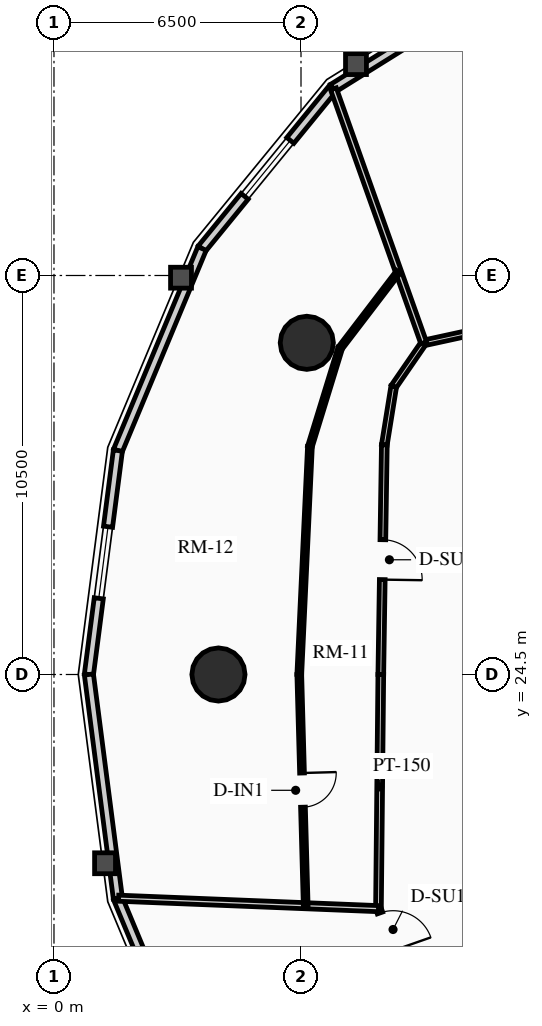
"""IFC4 building model, lengths in metres.
Left out: names, types, materials, properties, quantities, classifications, styles, units other than length and angle.
Written with IfcOpenShell. Run it as: python <this file> out.ifc"""

import sys

from ifc_helpers import new_model, si_unit, direction, frame, frame_2d, origin, origin_2d, place, context, subcontext, project, spatial, rectangle, circle, extrude, source, transform, mapped, element, fill, save


model = new_model("IFC4")
c1 = context("Model", 3, precision=1e-05, world=origin(), true_north=direction((0.0, 1.0)))
c2 = subcontext(c1, "Body", "Model", "MODEL_VIEW")
j1 = project(units=[si_unit("LENGTHUNIT", "METRE"), si_unit("PLANEANGLEUNIT", "RADIAN")], contexts=[c1])
p1 = place(None, origin())
s1 = spatial("IfcSite", under=j1, at=p1, CompositionType="ELEMENT")
p2 = place(p1, origin())
s2 = spatial("IfcBuilding", under=s1, at=p2, CompositionType="ELEMENT")
p3 = place(p2, frame((0.0, 0.0, 116.71)))
s3 = spatial("IfcBuildingStorey", under=s2, at=p3, CompositionType="ELEMENT", Elevation=116.71)
for number, where, z_axis, x_axis in (
    (1, (6.653, 33.229, 0.0), (0.0, 0.0, 1.0), (1.0, 0.0, 0.0)),
    (2, (4.328, 24.5, 0.0), (0.0, 0.0, 1.0), (1.0, 0.0, 0.0)),
):
    element("IfcColumn", number, at=place(p3, frame(where, z_axis=z_axis, x_axis=x_axis)), inside=s3, PredefinedType="USERDEFINED", context=c2, shape_type="SweptSolid", body=[
        extrude(circle(Radius=0.7, at=origin_2d()), origin(), (0.0, 0.0, 1.0), 2.91),
    ])
p4 = place(p3, frame((7.342, 39.928, 0.0), z_axis=(0.0, 0.0, 1.0), x_axis=(0.848520380187, 0.529162701263, 0.0)))
e3 = element("IfcWall", 3, at=p4, inside=s3, PredefinedType="SOLIDWALL", context=c2, shape_type="SweptSolid", body=[
    extrude(rectangle(XDim=5.119, YDim=0.24, at=frame_2d((2.56, 0.0))), origin(), (0.0, 0.0, 1.0), 2.179),
])
p5 = place(p3, frame((3.895, 35.709, 0.0), z_axis=(0.0, 0.0, 1.0), x_axis=(0.632700781152, 0.77439635945, 0.0)))
e4 = element("IfcWall", 4, at=p5, inside=s3, PredefinedType="SOLIDWALL", context=c2, shape_type="SweptSolid", body=[
    extrude(rectangle(XDim=5.448, YDim=0.24, at=frame_2d((2.724, 0.0))), origin(), (0.0, 0.0, 1.0), 2.179),
])
m1 = source(origin(), c2, "Body", "SweptSolid", [
    extrude(rectangle(XDim=1.9, YDim=1.35, at=frame_2d((0.95, 0.675))), frame((0.0, 0.13, 0.0), z_axis=(0.0, -1.0, 0.0), x_axis=(1.0, 0.0, 0.0)), (0.0, 0.0, 1.0), 0.26),
])
p6 = place(p5, frame((1.774, 0.0, 0.65)))
e5 = element("IfcOpeningElement", 5, at=p6, cuts=e4, PredefinedType="OPENING", context=c2, shape_type="MappedRepresentation", body=[
    mapped(m1, transform((0.0, 0.0, 0.0), x_axis=(1.0, 0.0, 0.0), y_axis=(0.0, 1.0, 0.0), z_axis=(0.0, 0.0, 1.0), scale=1.0)),
])
p7 = place(p3, frame((1.682, 30.393, 0.0), z_axis=(0.0, 0.0, 1.0), x_axis=(0.384344417632, 0.923189779317, 0.0)))
e6 = element("IfcWall", 6, at=p7, inside=s3, PredefinedType="SOLIDWALL", context=c2, shape_type="SweptSolid", body=[
    extrude(rectangle(XDim=5.758, YDim=0.24, at=frame_2d((2.879, 0.0))), origin(), (0.0, 0.0, 1.0), 2.179),
])
p8 = place(p3, frame((0.919, 24.5, 0.0), z_axis=(0.0, 0.0, 1.0), x_axis=(0.128351991996, 0.991728675672, 0.0)))
e7 = element("IfcWall", 7, at=p8, inside=s3, PredefinedType="SOLIDWALL", context=c2, shape_type="SweptSolid", body=[
    extrude(rectangle(XDim=5.942, YDim=0.24, at=frame_2d((2.971, 0.0))), origin(), (0.0, 0.0, 1.0), 2.179),
])
p9 = place(p8, frame((2.021, 0.0, 0.65)))
e8 = element("IfcOpeningElement", 8, at=p9, cuts=e7, PredefinedType="OPENING", context=c2, shape_type="MappedRepresentation", body=[
    mapped(m1, transform((0.0, 0.0, 0.0), x_axis=(1.0, 0.0, 0.0), y_axis=(0.0, 1.0, 0.0), z_axis=(0.0, 0.0, 1.0), scale=1.0)),
])
p10 = place(p3, frame((1.682, 18.607, 0.0), z_axis=(0.0, 0.0, 1.0), x_axis=(-0.128351991996, 0.991728675672, 0.0)))
e9 = element("IfcWall", 9, at=p10, inside=s3, PredefinedType="SOLIDWALL", context=c2, shape_type="SweptSolid", body=[
    extrude(rectangle(XDim=5.942, YDim=0.24, at=frame_2d((2.971, 0.0))), origin(), (0.0, 0.0, 1.0), 2.179),
])
p11 = place(p3, frame((3.895, 13.291, 0.0), z_axis=(0.0, 0.0, 1.0), x_axis=(-0.384344417632, 0.923189779317, 0.0)))
e10 = element("IfcWall", 10, at=p11, inside=s3, PredefinedType="SOLIDWALL", context=c2, shape_type="SweptSolid", body=[
    extrude(rectangle(XDim=5.758, YDim=0.24, at=frame_2d((2.879, 0.0))), origin(), (0.0, 0.0, 1.0), 2.179),
])
m2 = source(origin(), c2, "Body", "SweptSolid", [
    extrude(rectangle(XDim=2.2, YDim=1.35, at=frame_2d((1.1, 0.675))), frame((0.0, 0.13, 0.0), z_axis=(0.0, -1.0, 0.0), x_axis=(1.0, 0.0, 0.0)), (0.0, 0.0, 1.0), 0.26),
])
p12 = place(p11, frame((1.779, 0.0, 0.65)))
e11 = element("IfcOpeningElement", 11, at=p12, cuts=e10, PredefinedType="OPENING", context=c2, shape_type="MappedRepresentation", body=[
    mapped(m2, transform((0.0, 0.0, 0.0), x_axis=(1.0, 0.0, 0.0), y_axis=(0.0, 1.0, 0.0), z_axis=(0.0, 0.0, 1.0), scale=1.0)),
])
p13 = place(p3, frame((11.62, 33.637, 0.0), z_axis=(0.0, 0.0, 1.0), x_axis=(-0.97702579435, -0.213121085711, 0.0)))
e12 = element("IfcWall", 12, at=p13, inside=s3, PredefinedType="PARTITIONING", context=c2, shape_type="SweptSolid", body=[
    extrude(rectangle(XDim=1.935, YDim=0.15, at=frame_2d((0.967, 0.0))), origin(), (0.0, 0.0, 1.0), 2.225),
])
p14 = place(p3, frame((9.729, 33.225, 0.0), z_axis=(0.0, 0.0, 1.0), x_axis=(-0.567183649484, -0.82359134755, 0.0)))
e13 = element("IfcWall", 13, at=p14, inside=s3, PredefinedType="PARTITIONING", context=c2, shape_type="SweptSolid", body=[
    extrude(rectangle(XDim=1.392, YDim=0.15, at=frame_2d((0.696, 0.0))), origin(), (0.0, 0.0, 1.0), 2.225),
])
p15 = place(p3, frame((8.94, 32.078, 0.0), z_axis=(0.0, 0.0, 1.0), x_axis=(-0.159148467753, -0.98725466077, 0.0)))
e14 = element("IfcWall", 14, at=p15, inside=s3, PredefinedType="PARTITIONING", context=c2, shape_type="SweptSolid", body=[
    extrude(rectangle(XDim=1.554, YDim=0.15, at=frame_2d((0.777, 0.0))), origin(), (0.0, 0.0, 1.0), 2.225),
])
p16 = place(p3, frame((8.693, 30.544, 0.0), z_axis=(0.0, 0.0, 1.0), x_axis=(-0.015307007986, -0.99988284089, 0.0)))
e15 = element("IfcWall", 15, at=p16, inside=s3, PredefinedType="PARTITIONING", context=c2, shape_type="SweptSolid", body=[
    extrude(rectangle(XDim=6.045, YDim=0.15, at=frame_2d((3.022, 0.0))), origin(), (0.0, 0.0, 1.0), 2.655),
])
m3 = source(origin(), c2, "Body", "SweptSolid", [
    extrude(rectangle(XDim=1.05, YDim=2.015, at=frame_2d((0.525, 1.007))), frame((0.0, 0.085, 0.0), z_axis=(0.0, -1.0, 0.0), x_axis=(1.0, 0.0, 0.0)), (0.0, 0.0, 1.0), 0.17),
])
p17 = place(p16, frame((2.497, 0.0, 0.0)))
e16 = element("IfcOpeningElement", 16, at=p17, cuts=e15, PredefinedType="OPENING", context=c2, shape_type="MappedRepresentation", body=[
    mapped(m3, transform((0.0, 0.0, 0.0), x_axis=(1.0, 0.0, 0.0), y_axis=(0.0, 1.0, 0.0), z_axis=(0.0, 0.0, 1.0), scale=1.0)),
])
p18 = place(p3, frame((8.6, 24.5, 0.0), z_axis=(0.0, 0.0, 1.0), x_axis=(-0.010023665349, -0.999949761805, 0.0)))
e17 = element("IfcWall", 17, at=p18, inside=s3, PredefinedType="PARTITIONING", context=c2, shape_type="SweptSolid", body=[
    extrude(rectangle(XDim=6.162, YDim=0.15, at=frame_2d((3.081, 0.0))), origin(), (0.0, 0.0, 1.0), 2.225),
])
p19 = place(p3, frame((8.538, 18.338, 0.0), z_axis=(0.0, 0.0, 1.0), x_axis=(0.331358150167, -0.94350504838, 0.0)))
e18 = element("IfcWall", 18, at=p19, inside=s3, PredefinedType="PARTITIONING", context=c2, shape_type="SweptSolid", body=[
    extrude(rectangle(XDim=1.424, YDim=0.15, at=frame_2d((0.712, 0.0))), origin(), (0.0, 0.0, 1.0), 2.225),
])
p20 = place(p19, frame((0.12, 0.0, 0.0)))
e19 = element("IfcOpeningElement", 19, at=p20, cuts=e18, PredefinedType="OPENING", context=c2, shape_type="MappedRepresentation", body=[
    mapped(m3, transform((0.0, 0.0, 0.0), x_axis=(1.0, 0.0, 0.0), y_axis=(0.0, 1.0, 0.0), z_axis=(0.0, 0.0, 1.0), scale=1.0)),
])
p21 = place(p3, frame((9.729, 33.225, 0.0), z_axis=(0.0, 0.0, 1.0), x_axis=(-0.334806049563, 0.942287063042, 0.0)))
e20 = element("IfcWall", 20, at=p21, inside=s3, PredefinedType="PARTITIONING", context=c2, shape_type="SweptSolid", body=[
    extrude(rectangle(XDim=7.097, YDim=0.16, at=frame_2d((3.548, 0.0))), origin(), (0.0, 0.0, 1.0), 2.179),
])
p22 = place(p3, frame((8.538, 18.338, 0.0), z_axis=(0.0, 0.0, 1.0), x_axis=(-0.999191355531, 0.04020740021, 0.0)))
e21 = element("IfcWall", 21, at=p22, inside=s3, PredefinedType="PARTITIONING", context=c2, shape_type="SweptSolid", body=[
    extrude(rectangle(XDim=6.843, YDim=0.16, at=frame_2d((3.422, 0.0))), origin(), (0.0, 0.0, 1.0), 2.179),
])
p23 = place(p3, frame((9.064, 35.097, 0.0), z_axis=(0.0, 0.0, 1.0), x_axis=(-0.607126893664, -0.794604892377, 0.0)))
e22 = element("IfcWall", 22, at=p23, inside=s3, PredefinedType="PARTITIONING", context=c2, shape_type="SweptSolid", body=[
    extrude(rectangle(XDim=2.524, YDim=0.125, at=frame_2d((1.262, 0.0))), origin(), (0.0, 0.0, 1.0), 2.179),
])
p24 = place(p3, frame((7.532, 33.092, 0.0), z_axis=(0.0, 0.0, 1.0), x_axis=(-0.293965637063, -0.955815988685, 0.0)))
e23 = element("IfcWall", 23, at=p24, inside=s3, PredefinedType="PARTITIONING", context=c2, shape_type="SweptSolid", body=[
    extrude(rectangle(XDim=2.712, YDim=0.125, at=frame_2d((1.356, 0.0))), origin(), (0.0, 0.0, 1.0), 2.225),
])
p25 = place(p3, frame((6.735, 30.5, 0.0), z_axis=(0.0, 0.0, 1.0), x_axis=(-0.046620801603, -0.998912659274, 0.0)))
e24 = element("IfcWall", 24, at=p25, inside=s3, PredefinedType="PARTITIONING", context=c2, shape_type="SweptSolid", body=[
    extrude(rectangle(XDim=6.007, YDim=0.125, at=frame_2d((3.003, 0.0))), origin(), (0.0, 0.0, 1.0), 2.655),
])
p26 = place(p3, frame((6.455, 24.5, 0.0), z_axis=(0.0, 0.0, 1.0), x_axis=(0.027753708707, -0.999614791634, 0.0)))
e25 = element("IfcWall", 25, at=p26, inside=s3, PredefinedType="PARTITIONING", context=c2, shape_type="SweptSolid", body=[
    extrude(rectangle(XDim=6.087, YDim=0.125, at=frame_2d((3.044, 0.0))), origin(), (0.0, 0.0, 1.0), 2.225),
])
m4 = source(origin(), c2, "Body", "SweptSolid", [
    extrude(rectangle(XDim=0.9, YDim=2.005, at=frame_2d((0.45, 1.002))), frame((0.0, 0.073, 0.0), z_axis=(0.0, -1.0, 0.0), x_axis=(1.0, 0.0, 0.0)), (0.0, 0.0, 1.0), 0.145),
])
p27 = place(p26, frame((2.594, 0.0, 0.0)))
e26 = element("IfcOpeningElement", 26, at=p27, cuts=e25, PredefinedType="OPENING", context=c2, shape_type="MappedRepresentation", body=[
    mapped(m4, transform((0.0, 0.0, 0.0), x_axis=(1.0, 0.0, 0.0), y_axis=(0.0, 1.0, 0.0), z_axis=(0.0, 0.0, 1.0), scale=1.0)),
])
m5 = source(origin(), c2, "Body", "SweptSolid", [
    extrude(rectangle(XDim=1.9, YDim=1.35, at=frame_2d((0.95, 0.675))), frame((0.0, 0.03, 0.0), z_axis=(0.0, -1.0, 0.0), x_axis=(1.0, 0.0, 0.0)), (0.0, 0.0, 1.0), 0.06),
])
p28 = place(p6, origin())
e27 = element("IfcWindow", 27, at=p28, inside=s3, PartitioningType="DOUBLE_PANEL_VERTICAL", PredefinedType="WINDOW", context=c2, shape_type="MappedRepresentation", body=[
    mapped(m5, transform((0.0, 0.0, 0.0), x_axis=(1.0, 0.0, 0.0), y_axis=(0.0, 1.0, 0.0), z_axis=(0.0, 0.0, 1.0), scale=1.0)),
])
fill(e5, e27)
p29 = place(p9, origin())
e28 = element("IfcWindow", 28, at=p29, inside=s3, PartitioningType="DOUBLE_PANEL_VERTICAL", PredefinedType="WINDOW", context=c2, shape_type="MappedRepresentation", body=[
    mapped(m5, transform((0.0, 0.0, 0.0), x_axis=(1.0, 0.0, 0.0), y_axis=(0.0, 1.0, 0.0), z_axis=(0.0, 0.0, 1.0), scale=1.0)),
])
fill(e8, e28)
m6 = source(origin(), c2, "Body", "SweptSolid", [
    extrude(rectangle(XDim=1.05, YDim=2.015, at=frame_2d((0.525, 1.007))), frame((0.0, 0.025, 0.0), z_axis=(0.0, -1.0, 0.0), x_axis=(1.0, 0.0, 0.0)), (0.0, 0.0, 1.0), 0.05),
])
p30 = place(p17, origin())
e29 = element("IfcDoor", 29, at=p30, inside=s3, OperationType="SINGLE_SWING_RIGHT", PredefinedType="DOOR", context=c2, shape_type="MappedRepresentation", body=[
    mapped(m6, transform((0.0, 0.0, 0.0), x_axis=(1.0, 0.0, 0.0), y_axis=(0.0, 1.0, 0.0), z_axis=(0.0, 0.0, 1.0), scale=1.0)),
])
fill(e16, e29)
m7 = source(origin(), c2, "Body", "SweptSolid", [
    extrude(rectangle(XDim=0.9, YDim=2.005, at=frame_2d((0.45, 1.002))), frame((0.0, 0.025, 0.0), z_axis=(0.0, -1.0, 0.0), x_axis=(1.0, 0.0, 0.0)), (0.0, 0.0, 1.0), 0.05),
])
p31 = place(p27, origin())
e30 = element("IfcDoor", 30, at=p31, inside=s3, OperationType="SINGLE_SWING_LEFT", PredefinedType="DOOR", context=c2, shape_type="MappedRepresentation", body=[
    mapped(m7, transform((0.0, 0.0, 0.0), x_axis=(1.0, 0.0, 0.0), y_axis=(0.0, 1.0, 0.0), z_axis=(0.0, 0.0, 1.0), scale=1.0)),
])
fill(e26, e30)
p32 = place(p20, origin())
e31 = element("IfcDoor", 31, at=p32, inside=s3, OperationType="SINGLE_SWING_RIGHT", PredefinedType="DOOR", context=c2, shape_type="MappedRepresentation", body=[
    mapped(m6, transform((0.0, 0.0, 0.0), x_axis=(1.0, 0.0, 0.0), y_axis=(0.0, 1.0, 0.0), z_axis=(0.0, 0.0, 1.0), scale=1.0)),
])
fill(e19, e31)
save(model, sys.argv[1])
